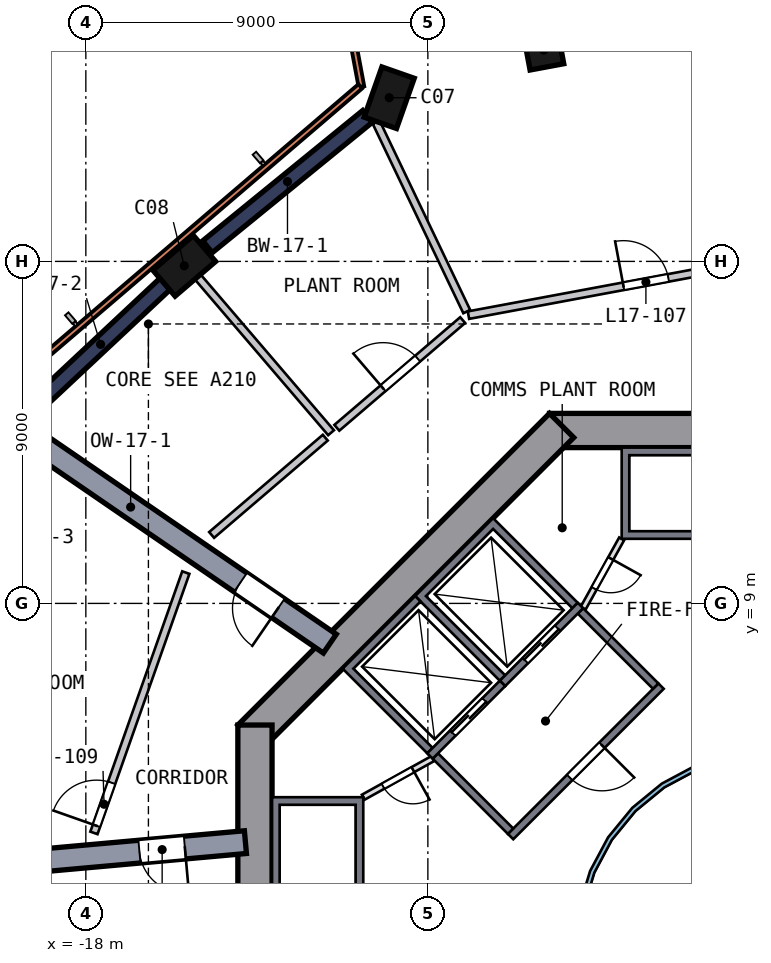
"""IFC4 building model, lengths in metres.
Left out: names, types, materials, properties, quantities, classifications, styles, units other than length and angle.
Written with IfcOpenShell. Run it as: python <this file> out.ifc"""

import sys

from ifc_helpers import new_model, si_unit, direction, frame, frame_2d, origin, origin_2d, place, context, subcontext, project, spatial, polyline, rectangle, outline, extrude, element, fill, save


model = new_model("IFC4")
c1 = context("Model", 3, precision=1e-05, world=origin(), true_north=direction((0.0, 1.0)))
c2 = subcontext(c1, "Body", "Model", "MODEL_VIEW")
j1 = project(units=[si_unit("LENGTHUNIT", "METRE"), si_unit("PLANEANGLEUNIT", "RADIAN")], contexts=[c1])
p1 = place(None, origin())
s1 = spatial("IfcSite", under=j1, at=p1, CompositionType="ELEMENT")
p2 = place(p1, origin())
s2 = spatial("IfcBuilding", under=s1, at=p2, CompositionType="ELEMENT")
p3 = place(p2, frame((0.0, 0.0, 75.0)))
s3 = spatial("IfcBuildingStorey", under=s2, at=p3, CompositionType="ELEMENT", Elevation=75.0)
p4 = place(p3, frame((-9.943, 22.341, 0.0), z_axis=(-0.062029974, -0.028200363, 0.99767581), x_axis=(0.330642475, 0.942575024, 0.047200405)))
e1 = element("IfcColumn", 1, at=p4, inside=s3, PredefinedType="COLUMN", context=c2, shape_type="SweptSolid", body=[
    extrude(rectangle(XDim=1.4, YDim=0.9, at=origin_2d()), origin(), (0.0, 0.0, 1.0), 4.51),
])
p5 = place(p3, frame((-15.351, 17.936, 0.0), z_axis=(-0.049588704, -0.043146504, 0.997837331), x_axis=(-0.758262845, -0.64862709, -0.065729414)))
e2 = element("IfcColumn", 2, at=p5, inside=s3, PredefinedType="COLUMN", context=c2, shape_type="SweptSolid", body=[
    extrude(rectangle(XDim=1.4, YDim=0.9, at=origin_2d()), origin(), (0.0, 0.0, 1.0), 4.51),
])
p6 = place(p3, frame((-5.871, 23.582, 0.0), z_axis=(-0.065604156, -0.016888198, 0.997702803), x_axis=(-0.183144553, 0.983075242, 0.004597888)))
e3 = element("IfcColumn", 3, at=p6, inside=s3, PredefinedType="COLUMN", context=c2, shape_type="SweptSolid", body=[
    extrude(rectangle(XDim=0.9, YDim=0.9, at=origin_2d()), origin(), (0.0, 0.0, 1.0), 4.51),
])
p7 = place(p3, frame((5.799, 13.55, 0.0), z_axis=(0.0, 0.0, 1.0), x_axis=(-1.0, 0.0, 0.0)))
e4 = element("IfcWall", 4, at=p7, inside=s3, PredefinedType="SHEAR", context=c2, shape_type="SweptSolid", body=[
    extrude(rectangle(XDim=11.598, YDim=0.9, at=frame_2d((5.799, 0.0))), origin(), (0.0, 0.0, 1.0), 6.0),
])
p8 = place(p7, frame((4.899, 0.0, 0.0)))
e5 = element("IfcOpeningElement", 5, at=p8, cuts=e4, PredefinedType="OPENING", context=c2, shape_type="SweptSolid", body=[
    extrude(rectangle(XDim=1.8, YDim=2.1, at=frame_2d((0.9, 1.05))), frame((0.0, 0.46, 0.0), z_axis=(0.0, -1.0, 0.0), x_axis=(1.0, 0.0, 0.0)), (0.0, 0.0, 1.0), 0.92),
])
p9 = place(p3, frame((-5.481, 13.682, 0.0), z_axis=(0.0, 0.0, 1.0), x_axis=(-0.707106781, -0.707106781, 0.0)))
e6 = element("IfcWall", 6, at=p9, inside=s3, PredefinedType="SHEAR", context=c2, shape_type="SweptSolid", body=[
    extrude(rectangle(XDim=11.598, YDim=0.9, at=frame_2d((5.799, 0.0))), origin(), (0.0, 0.0, 1.0), 6.0),
])
p10 = place(p3, frame((-13.55, 5.799, 0.0), z_axis=(0.0, 0.0, 1.0), x_axis=(0.0, -1.0, 0.0)))
e7 = element("IfcWall", 7, at=p10, inside=s3, PredefinedType="SHEAR", context=c2, shape_type="SweptSolid", body=[
    extrude(rectangle(XDim=11.598, YDim=0.9, at=frame_2d((5.799, 0.0))), origin(), (0.0, 0.0, 1.0), 6.0),
])
p11 = place(p10, frame((4.899, 0.0, 0.0)))
e8 = element("IfcOpeningElement", 8, at=p11, cuts=e7, PredefinedType="OPENING", context=c2, shape_type="SweptSolid", body=[
    extrude(rectangle(XDim=1.8, YDim=2.1, at=frame_2d((0.9, 1.05))), frame((0.0, 0.46, 0.0), z_axis=(0.0, -1.0, 0.0), x_axis=(1.0, 0.0, 0.0)), (0.0, 0.0, 1.0), 0.92),
])
p12 = place(p3, frame((-10.588, 21.816, 0.0), z_axis=(0.0, 0.0, 1.0), x_axis=(-0.775345008, -0.6315379, 0.0)))
e9 = element("IfcWall", 9, at=p12, inside=s3, PredefinedType="SHEAR", context=c2, shape_type="SweptSolid", body=[
    extrude(rectangle(XDim=5.433, YDim=0.4, at=frame_2d((2.716, 0.0))), origin(), (0.0, 0.0, 1.0), 4.5),
])
p13 = place(p3, frame((-15.876, 17.444, 0.0), z_axis=(0.0, 0.0, 1.0), x_axis=(-0.729873203, -0.683582553, 0.0)))
e10 = element("IfcWall", 10, at=p13, inside=s3, PredefinedType="SHEAR", context=c2, shape_type="SweptSolid", body=[
    extrude(rectangle(XDim=4.757, YDim=0.4, at=frame_2d((2.379, 0.0))), origin(), (0.0, 0.0, 1.0), 4.5),
])
p14 = place(p3, frame((-11.58, 7.941, 0.0), z_axis=(0.0, 0.0, 1.0), x_axis=(-0.824719758, 0.565541617, 0.0)))
e11 = element("IfcWall", 11, at=p14, inside=s3, PredefinedType="SHEAR", context=c2, shape_type="SweptSolid", body=[
    extrude(rectangle(XDim=9.66, YDim=0.6, at=frame_2d((4.83, 0.0))), origin(), (0.0, 0.0, 1.0), 4.5),
])
p15 = place(p14, frame((1.65, 0.0, 0.0)))
e12 = element("IfcOpeningElement", 12, at=p15, cuts=e11, PredefinedType="OPENING", context=c2, shape_type="SweptSolid", body=[
    extrude(rectangle(XDim=1.2, YDim=2.1, at=frame_2d((0.6, 1.05))), frame((0.0, 0.31, 0.0), z_axis=(0.0, -1.0, 0.0), x_axis=(1.0, 0.0, 0.0)), (0.0, 0.0, 1.0), 0.62),
])
p16 = place(p3, frame((-13.801, 2.718, 0.0), z_axis=(0.0, 0.0, 1.0), x_axis=(-0.995986555, -0.089502977, 0.0)))
e13 = element("IfcWall", 13, at=p16, inside=s3, PredefinedType="SHEAR", context=c2, shape_type="SweptSolid", body=[
    extrude(rectangle(XDim=9.869, YDim=0.6, at=frame_2d((4.935, 0.0))), origin(), (0.0, 0.0, 1.0), 4.5),
])
p17 = place(p16, frame((1.6, 0.0, 0.0)))
e14 = element("IfcOpeningElement", 14, at=p17, cuts=e13, PredefinedType="OPENING", context=c2, shape_type="SweptSolid", body=[
    extrude(rectangle(XDim=1.2, YDim=2.1, at=frame_2d((0.6, 1.05))), frame((0.0, 0.31, 0.0), z_axis=(0.0, -1.0, 0.0), x_axis=(1.0, 0.0, 0.0)), (0.0, 0.0, 1.0), 0.62),
])
p18 = place(p3, frame((-13.396, 36.797, 0.0), z_axis=(0.0, 0.0, 1.0), x_axis=(0.183277169, -0.98306128, 0.0)))
e15 = element("IfcWall", 15, at=p18, inside=s3, PredefinedType="SOLIDWALL", context=c2, shape_type="SweptSolid", body=[
    extrude(rectangle(XDim=14.445, YDim=0.15, at=frame_2d((7.223, 0.0))), origin(), (0.0, 0.0, 1.0), 4.5),
])
p19 = place(p3, frame((-10.778, 22.607, 0.0), z_axis=(0.0, 0.0, 1.0), x_axis=(-0.759721378, -0.650248743, 0.0)))
e16 = element("IfcWall", 16, at=p19, inside=s3, PredefinedType="SOLIDWALL", context=c2, shape_type="SweptSolid", body=[
    extrude(rectangle(XDim=13.046, YDim=0.15, at=frame_2d((6.523, 0.0))), origin(), (0.0, 0.0, 1.0), 4.5),
])
p20 = place(p3, origin())
e17 = element("IfcWall", 17, at=p20, inside=s3, PredefinedType="SOLIDWALL", context=c2, shape_type="SweptSolid", body=[
    extrude(outline(polyline([(-3.9, 10.7), (-3.9, 13.1), (-1.2, 13.1), (-1.2, 10.7), (-3.9, 10.7)]), holes=[polyline([(-1.4, 12.9), (-3.7, 12.9), (-3.7, 10.9), (-1.4, 10.9), (-1.4, 12.9)])]), origin(), (0.0, 0.0, 1.0), 5.55),
])
p21 = place(p3, origin())
e18 = element("IfcWall", 18, at=p21, inside=s3, PredefinedType="SOLIDWALL", context=c2, shape_type="SweptSolid", body=[
    extrude(outline(polyline([(-13.1, 1.2), (-13.1, 3.9), (-10.7, 3.9), (-10.7, 1.2), (-13.1, 1.2)]), holes=[polyline([(-10.9, 3.7), (-12.9, 3.7), (-12.9, 1.4), (-10.9, 1.4), (-10.9, 3.7)])]), origin(), (0.0, 0.0, 1.0), 5.55),
])
p22 = place(p3, origin())
e19 = element("IfcWall", 19, at=p22, inside=s3, PredefinedType="SOLIDWALL", context=c2, shape_type="SweptSolid", body=[
    extrude(outline(polyline([(-9.334, 9.192), (-7.283, 11.243), (-5.056, 9.016), (-5.197, 8.874), (-7.283, 10.96), (-9.051, 9.192), (-6.965, 7.106), (-7.106, 6.965), (-9.334, 9.192)])), origin(), (0.0, 0.0, 1.0), 5.55),
])
p23 = place(p3, frame((-4.985, 8.945, 0.0), z_axis=(0.0, 0.0, 1.0), x_axis=(-0.707106781, -0.707106781, 0.0)))
e20 = element("IfcWall", 20, at=p23, inside=s3, PredefinedType="SOLIDWALL", context=c2, shape_type="SweptSolid", body=[
    extrude(rectangle(XDim=2.9, YDim=0.2, at=frame_2d((1.45, 0.0))), origin(), (0.0, 0.0, 1.0), 5.55),
])
p24 = place(p23, frame((0.85, 0.0, 0.0)))
e21 = element("IfcOpeningElement", 21, at=p24, cuts=e20, PredefinedType="OPENING", context=c2, shape_type="SweptSolid", body=[
    extrude(rectangle(XDim=1.2, YDim=2.1, at=frame_2d((0.6, 1.05))), frame((0.0, 0.11, 0.0), z_axis=(0.0, -1.0, 0.0), x_axis=(1.0, 0.0, 0.0)), (0.0, 0.0, 1.0), 0.22),
])
p25 = place(p3, origin())
e22 = element("IfcWall", 22, at=p25, inside=s3, PredefinedType="SOLIDWALL", context=c2, shape_type="SweptSolid", body=[
    extrude(outline(polyline([(-11.243, 7.283), (-9.334, 9.192), (-9.192, 9.051), (-10.96, 7.283), (-8.874, 5.197), (-9.016, 5.056), (-11.243, 7.283)])), origin(), (0.0, 0.0, 1.0), 5.55),
])
p26 = place(p3, frame((-7.036, 6.894, 0.0), z_axis=(0.0, 0.0, 1.0), x_axis=(-0.707106781, -0.707106781, 0.0)))
e23 = element("IfcWall", 23, at=p26, inside=s3, PredefinedType="SOLIDWALL", context=c2, shape_type="SweptSolid", body=[
    extrude(rectangle(XDim=2.7, YDim=0.2, at=frame_2d((1.35, 0.0))), origin(), (0.0, 0.0, 1.0), 5.55),
])
p27 = place(p26, frame((0.65, 0.0, 0.0)))
e24 = element("IfcOpeningElement", 24, at=p27, cuts=e23, PredefinedType="OPENING", context=c2, shape_type="SweptSolid", body=[
    extrude(rectangle(XDim=1.2, YDim=2.1, at=frame_2d((0.6, 1.05))), frame((0.0, 0.11, 0.0), z_axis=(0.0, -1.0, 0.0), x_axis=(1.0, 0.0, 0.0)), (0.0, 0.0, 1.0), 0.22),
])
p28 = place(p3, frame((-2.864, 6.823, 0.0), z_axis=(0.0, 0.0, 1.0), x_axis=(-0.707106781, -0.707106781, 0.0)))
e25 = element("IfcWall", 25, at=p28, inside=s3, PredefinedType="SOLIDWALL", context=c2, shape_type="SweptSolid", body=[
    extrude(rectangle(XDim=5.6, YDim=0.2, at=frame_2d((2.8, 0.0))), origin(), (0.0, 0.0, 1.0), 5.55),
])
p29 = place(p28, frame((2.2, 0.0, 0.0)))
e26 = element("IfcOpeningElement", 26, at=p29, cuts=e25, PredefinedType="OPENING", context=c2, shape_type="SweptSolid", body=[
    extrude(rectangle(XDim=1.2, YDim=2.1, at=frame_2d((0.6, 1.05))), frame((0.0, 0.11, 0.0), z_axis=(0.0, -1.0, 0.0), x_axis=(1.0, 0.0, 0.0)), (0.0, 0.0, 1.0), 0.22),
])
for number, where, z_axis, x_axis in (
    (27, (-3.005, 6.823, 0.0), (0.0, 0.0, 1.0), (-0.707, 0.707, 0.0)),
    (28, (-6.823, 3.005, 0.0), (0.0, 0.0, 1.0), (-0.707, 0.707, 0.0)),
):
    element("IfcWall", number, at=place(p3, frame(where, z_axis=z_axis, x_axis=x_axis)), inside=s3, PredefinedType="SOLIDWALL", context=c2, shape_type="SweptSolid", body=[
        extrude(rectangle(XDim=2.8, YDim=0.2, at=frame_2d((1.4, 0.0))), origin(), (0.0, 0.0, 1.0), 5.55),
    ])
p30 = place(p3, frame((-3.9, 10.7, 0.0), z_axis=(0.0, 0.0, 1.0), x_axis=(-0.485692555, -0.874129705, 0.0)))
e29 = element("IfcWall", 29, at=p30, inside=s3, PredefinedType="PARTITIONING", context=c2, shape_type="SweptSolid", body=[
    extrude(rectangle(XDim=2.089, YDim=0.15, at=frame_2d((1.044, 0.0))), origin(), (0.0, 0.0, 1.0), 5.55),
])
p31 = place(p30, frame((0.594, 0.0, 0.0)))
e30 = element("IfcOpeningElement", 30, at=p31, cuts=e29, PredefinedType="OPENING", context=c2, shape_type="SweptSolid", body=[
    extrude(rectangle(XDim=0.9, YDim=2.1, at=frame_2d((0.45, 1.05))), frame((0.0, 0.085, 0.0), z_axis=(0.0, -1.0, 0.0), x_axis=(1.0, 0.0, 0.0)), (0.0, 0.0, 1.0), 0.17),
])
p32 = place(p3, frame((-8.874, 4.914, 0.0), z_axis=(0.0, 0.0, 1.0), x_axis=(-0.874129705, -0.485692555, 0.0)))
e31 = element("IfcWall", 31, at=p32, inside=s3, PredefinedType="PARTITIONING", context=c2, shape_type="SweptSolid", body=[
    extrude(rectangle(XDim=2.089, YDim=0.15, at=frame_2d((1.044, 0.0))), origin(), (0.0, 0.0, 1.0), 5.55),
])
p33 = place(p32, frame((0.594, 0.0, 0.0)))
e32 = element("IfcOpeningElement", 32, at=p33, cuts=e31, PredefinedType="OPENING", context=c2, shape_type="SweptSolid", body=[
    extrude(rectangle(XDim=0.9, YDim=2.1, at=frame_2d((0.45, 1.05))), frame((0.0, 0.085, 0.0), z_axis=(0.0, -1.0, 0.0), x_axis=(1.0, 0.0, 0.0)), (0.0, 0.0, 1.0), 0.17),
])
p34 = place(p3, origin())
e33 = element("IfcWall", 33, at=p34, inside=s3, PredefinedType="SOLIDWALL", context=c2, shape_type="SweptSolid", body=[
    extrude(outline(polyline([(5.021, -0.999), (4.73, -1.959), (4.257, -2.844), (3.62, -3.62), (2.844, -4.257), (1.959, -4.73), (0.999, -5.021), (0.0, -5.12), (-0.999, -5.021), (-1.959, -4.73), (-2.844, -4.257), (-3.62, -3.62), (-4.257, -2.844), (-4.73, -1.959), (-5.021, -0.999), (-5.12, 0.0), (-5.021, 0.999), (-4.73, 1.959), (-4.257, 2.844), (-3.62, 3.62), (-2.844, 4.257), (-1.959, 4.73), (-0.999, 5.021), (0.0, 5.12), (0.999, 5.021), (1.959, 4.73), (2.844, 4.257), (3.62, 3.62), (4.257, 2.844), (4.73, 1.959), (5.021, 0.999), (5.12, 0.0), (5.021, -0.999)]), holes=[polyline([(4.904, 0.976), (4.619, 1.913), (4.157, 2.778), (3.535, 3.535), (2.778, 4.157), (1.913, 4.619), (0.976, 4.904), (0.0, 5.0), (-0.976, 4.904), (-1.913, 4.619), (-2.778, 4.157), (-3.535, 3.535), (-4.157, 2.778), (-4.619, 1.913), (-4.904, 0.976), (-5.0, 0.0), (-4.904, -0.976), (-4.619, -1.913), (-4.157, -2.778), (-3.535, -3.535), (-2.778, -4.157), (-1.913, -4.619), (-0.976, -4.904), (0.0, -5.0), (0.976, -4.904), (1.913, -4.619), (2.778, -4.157), (3.535, -3.535), (4.157, -2.778), (4.619, -1.913), (4.904, -0.976), (5.0, 0.0), (4.904, 0.976)])]), origin(), (0.0, 0.0, 1.0), 5.55),
])
p35 = place(p3, frame((-17.787, 2.96, 0.0), z_axis=(0.0, 0.0, 1.0), x_axis=(0.332834181, 0.94298537, 0.0)))
e34 = element("IfcWall", 34, at=p35, inside=s3, PredefinedType="SOLIDWALL", context=c2, shape_type="SweptSolid", body=[
    extrude(rectangle(XDim=7.265, YDim=0.2, at=frame_2d((3.632, 0.0))), origin(), (0.0, 0.0, 1.0), 4.5),
])
p36 = place(p35, frame((0.2, 0.0, 0.0)))
e35 = element("IfcOpeningElement", 35, at=p36, cuts=e34, PredefinedType="OPENING", context=c2, shape_type="SweptSolid", body=[
    extrude(rectangle(XDim=1.2, YDim=2.1, at=frame_2d((0.6, 1.05))), frame((0.0, 0.11, 0.0), z_axis=(0.0, -1.0, 0.0), x_axis=(1.0, 0.0, 0.0)), (0.0, 0.0, 1.0), 0.22),
])
p37 = place(p3, frame((-11.547, 13.491, 0.0), z_axis=(0.0, 0.0, 1.0), x_axis=(-0.650233927, 0.759734059, 0.0)))
e36 = element("IfcWall", 36, at=p37, inside=s3, PredefinedType="SOLIDWALL", context=c2, shape_type="SweptSolid", body=[
    extrude(rectangle(XDim=6.35, YDim=0.2, at=frame_2d((3.175, 0.0))), origin(), (0.0, 0.0, 1.0), 4.5),
])
p38 = place(p3, frame((-11.699, 13.361, 0.0), z_axis=(0.0, 0.0, 1.0), x_axis=(-0.759716073, -0.650254941, 0.0)))
e37 = element("IfcWall", 37, at=p38, inside=s3, PredefinedType="SOLIDWALL", context=c2, shape_type="SweptSolid", body=[
    extrude(rectangle(XDim=3.937, YDim=0.2, at=frame_2d((1.968, 0.0))), origin(), (0.0, 0.0, 1.0), 4.5),
])
p39 = place(p3, frame((-11.395, 13.622, 0.0), z_axis=(0.0, 0.0, 1.0), x_axis=(0.759742775, 0.650223742, 0.0)))
e38 = element("IfcWall", 38, at=p39, inside=s3, PredefinedType="SOLIDWALL", context=c2, shape_type="SweptSolid", body=[
    extrude(rectangle(XDim=4.358, YDim=0.2, at=frame_2d((2.179, 0.0))), origin(), (0.0, 0.0, 1.0), 4.5),
])
p40 = place(p39, frame((1.6, 0.0, 0.0)))
e39 = element("IfcOpeningElement", 39, at=p40, cuts=e38, PredefinedType="OPENING", context=c2, shape_type="SweptSolid", body=[
    extrude(rectangle(XDim=1.2, YDim=2.1, at=frame_2d((0.6, 1.05))), frame((0.0, 0.11, 0.0), z_axis=(0.0, -1.0, 0.0), x_axis=(1.0, 0.0, 0.0)), (0.0, 0.0, 1.0), 0.22),
])
p41 = place(p3, frame((-7.977, 16.679, 0.0), z_axis=(0.0, 0.0, 1.0), x_axis=(-0.431486765, 0.902119267, 0.0)))
e40 = element("IfcWall", 40, at=p41, inside=s3, PredefinedType="SOLIDWALL", context=c2, shape_type="SweptSolid", body=[
    extrude(rectangle(XDim=5.526, YDim=0.2, at=frame_2d((2.763, 0.0))), origin(), (0.0, 0.0, 1.0), 4.5),
])
p42 = place(p3, frame((-7.932, 16.585, 0.0), z_axis=(0.0, 0.0, 1.0), x_axis=(0.983060939, 0.183278995, 0.0)))
e41 = element("IfcWall", 41, at=p42, inside=s3, PredefinedType="SOLIDWALL", context=c2, shape_type="SweptSolid", body=[
    extrude(rectangle(XDim=9.316, YDim=0.2, at=frame_2d((4.658, 0.0))), origin(), (0.0, 0.0, 1.0), 4.5),
])
p43 = place(p42, frame((4.15, 0.0, 0.0)))
e42 = element("IfcOpeningElement", 42, at=p43, cuts=e41, PredefinedType="OPENING", context=c2, shape_type="SweptSolid", body=[
    extrude(rectangle(XDim=1.2, YDim=2.1, at=frame_2d((0.6, 1.05))), frame((0.0, 0.11, 0.0), z_axis=(0.0, -1.0, 0.0), x_axis=(1.0, 0.0, 0.0)), (0.0, 0.0, 1.0), 0.22),
])
p44 = place(p24, origin())
e43 = element("IfcDoor", 43, at=p44, inside=s3, OperationType="DOUBLE_DOOR_SLIDING", PredefinedType="DOOR", context=c2, shape_type="SweptSolid", body=[
    extrude(rectangle(XDim=1.2, YDim=2.1, at=frame_2d((0.6, 1.05))), frame((0.0, 0.025, 0.0), z_axis=(0.0, -1.0, 0.0), x_axis=(1.0, 0.0, 0.0)), (0.0, 0.0, 1.0), 0.05),
])
fill(e21, e43)
p45 = place(p27, origin())
e44 = element("IfcDoor", 44, at=p45, inside=s3, OperationType="DOUBLE_DOOR_SLIDING", PredefinedType="DOOR", context=c2, shape_type="SweptSolid", body=[
    extrude(rectangle(XDim=1.2, YDim=2.1, at=frame_2d((0.6, 1.05))), frame((0.0, 0.025, 0.0), z_axis=(0.0, -1.0, 0.0), x_axis=(1.0, 0.0, 0.0)), (0.0, 0.0, 1.0), 0.05),
])
fill(e24, e44)
p46 = place(p29, origin())
e45 = element("IfcDoor", 45, at=p46, inside=s3, OperationType="SINGLE_SWING_LEFT", PredefinedType="DOOR", context=c2, shape_type="SweptSolid", body=[
    extrude(rectangle(XDim=1.2, YDim=2.1, at=frame_2d((0.6, 1.05))), frame((0.0, 0.025, 0.0), z_axis=(0.0, -1.0, 0.0), x_axis=(1.0, 0.0, 0.0)), (0.0, 0.0, 1.0), 0.05),
])
fill(e26, e45)
p47 = place(p31, origin())
e46 = element("IfcDoor", 46, at=p47, inside=s3, OperationType="SINGLE_SWING_LEFT", PredefinedType="DOOR", context=c2, shape_type="SweptSolid", body=[
    extrude(rectangle(XDim=0.9, YDim=2.1, at=frame_2d((0.45, 1.05))), frame((0.0, 0.025, 0.0), z_axis=(0.0, -1.0, 0.0), x_axis=(1.0, 0.0, 0.0)), (0.0, 0.0, 1.0), 0.05),
])
fill(e30, e46)
p48 = place(p33, origin())
e47 = element("IfcDoor", 47, at=p48, inside=s3, OperationType="SINGLE_SWING_LEFT", PredefinedType="DOOR", context=c2, shape_type="SweptSolid", body=[
    extrude(rectangle(XDim=0.9, YDim=2.1, at=frame_2d((0.45, 1.05))), frame((0.0, 0.025, 0.0), z_axis=(0.0, -1.0, 0.0), x_axis=(1.0, 0.0, 0.0)), (0.0, 0.0, 1.0), 0.05),
])
fill(e32, e47)
p49 = place(p15, origin())
e48 = element("IfcDoor", 48, at=p49, inside=s3, OperationType="SINGLE_SWING_LEFT", PredefinedType="DOOR", context=c2, shape_type="SweptSolid", body=[
    extrude(rectangle(XDim=1.2, YDim=2.1, at=frame_2d((0.6, 1.05))), frame((0.0, 0.025, 0.0), z_axis=(0.0, -1.0, 0.0), x_axis=(1.0, 0.0, 0.0)), (0.0, 0.0, 1.0), 0.05),
])
fill(e12, e48)
p50 = place(p17, origin())
e49 = element("IfcDoor", 49, at=p50, inside=s3, OperationType="SINGLE_SWING_LEFT", PredefinedType="DOOR", context=c2, shape_type="SweptSolid", body=[
    extrude(rectangle(XDim=1.2, YDim=2.1, at=frame_2d((0.6, 1.05))), frame((0.0, 0.025, 0.0), z_axis=(0.0, -1.0, 0.0), x_axis=(1.0, 0.0, 0.0)), (0.0, 0.0, 1.0), 0.05),
])
fill(e14, e49)
p51 = place(p43, origin())
e50 = element("IfcDoor", 50, at=p51, inside=s3, OperationType="SINGLE_SWING_LEFT", PredefinedType="DOOR", context=c2, shape_type="SweptSolid", body=[
    extrude(rectangle(XDim=1.2, YDim=2.1, at=frame_2d((0.6, 1.05))), frame((0.0, 0.025, 0.0), z_axis=(0.0, -1.0, 0.0), x_axis=(1.0, 0.0, 0.0)), (0.0, 0.0, 1.0), 0.05),
])
fill(e42, e50)
p52 = place(p40, origin())
e51 = element("IfcDoor", 51, at=p52, inside=s3, OperationType="SINGLE_SWING_LEFT", PredefinedType="DOOR", context=c2, shape_type="SweptSolid", body=[
    extrude(rectangle(XDim=1.2, YDim=2.1, at=frame_2d((0.6, 1.05))), frame((0.0, 0.025, 0.0), z_axis=(0.0, -1.0, 0.0), x_axis=(1.0, 0.0, 0.0)), (0.0, 0.0, 1.0), 0.05),
])
fill(e39, e51)
p53 = place(p36, origin())
e52 = element("IfcDoor", 52, at=p53, inside=s3, OperationType="SINGLE_SWING_LEFT", PredefinedType="DOOR", context=c2, shape_type="SweptSolid", body=[
    extrude(rectangle(XDim=1.2, YDim=2.1, at=frame_2d((0.6, 1.05))), frame((0.0, 0.025, 0.0), z_axis=(0.0, -1.0, 0.0), x_axis=(1.0, 0.0, 0.0)), (0.0, 0.0, 1.0), 0.05),
])
fill(e35, e52)
save(model, sys.argv[1])
